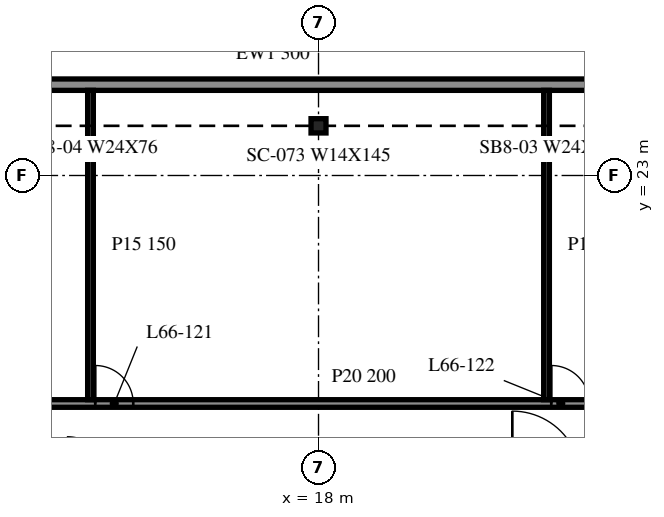
"""IFC4 building model, lengths in metres.
Left out: names, types, materials, properties, quantities, classifications, styles, units other than length and angle.
Written with IfcOpenShell. Run it as: python <this file> out.ifc"""

import sys

from ifc_helpers import new_model, si_unit, direction, frame, frame_2d, origin, origin_2d, place, context, subcontext, project, spatial, rectangle, i_section, extrude, element, fill, save


model = new_model("IFC4")
c1 = context("Model", 3, precision=1e-05, world=origin(), true_north=direction((0.0, 1.0)))
c2 = subcontext(c1, "Body", "Model", "MODEL_VIEW")
j1 = project(units=[si_unit("LENGTHUNIT", "METRE"), si_unit("PLANEANGLEUNIT", "RADIAN")], contexts=[c1])
p1 = place(None, origin())
s1 = spatial("IfcSite", under=j1, at=p1, CompositionType="ELEMENT")
p2 = place(p1, origin())
s2 = spatial("IfcBuilding", under=s1, at=p2, CompositionType="ELEMENT")
p3 = place(p2, frame((0.0, 0.0, 270.9)))
s3 = spatial("IfcBuildingStorey", under=s2, at=p3, CompositionType="ELEMENT", Elevation=270.9)
p4 = place(p3, frame((18.0, 24.307, -0.34), z_axis=(0.0, 0.0, 1.0), x_axis=(1.0, 0.0, 0.0)))
e1 = element("IfcColumn", 1, at=p4, inside=s3, PredefinedType="COLUMN", context=c2, shape_type="SweptSolid", body=[
    extrude(i_section(OverallWidth=0.394, OverallDepth=0.376, WebThickness=0.017, FlangeThickness=0.028, at=origin_2d()), origin(), (0.0, 0.0, 1.0), 3.8),
])
p5 = place(p3, frame((42.0, 25.39, 0.0), z_axis=(0.0, 0.0, 1.0), x_axis=(-1.0, 0.0, 0.0)))
e2 = element("IfcWall", 2, at=p5, inside=s3, PredefinedType="NOTDEFINED", context=c2, shape_type="SweptSolid", body=[
    extrude(rectangle(XDim=84.0, YDim=0.3, at=frame_2d((42.0, 0.0))), origin(), (0.0, 0.0, 1.0), 2.853),
])
p6 = place(p3, frame((-47.975, 17.0, 0.0), z_axis=(0.0, 0.0, 1.0), x_axis=(1.0, 0.0, 0.0)))
e3 = element("IfcWall", 3, at=p6, inside=s3, PredefinedType="PARTITIONING", context=c2, shape_type="SweptSolid", body=[
    extrude(rectangle(XDim=95.95, YDim=0.2, at=frame_2d((47.975, 0.0))), origin(), (0.0, 0.0, 1.0), 3.46),
])
p7 = place(p6, frame((10.7, 0.0, 0.0)))
e4 = element("IfcOpeningElement", 4, at=p7, cuts=e3, PredefinedType="OPENING", context=c2, shape_type="SweptSolid", body=[
    extrude(rectangle(XDim=0.9, YDim=2.1, at=frame_2d((0.45, 1.05))), frame((0.0, 0.11, 0.0), z_axis=(0.0, -1.0, 0.0), x_axis=(1.0, 0.0, 0.0)), (0.0, 0.0, 1.0), 0.22),
])
p8 = place(p6, frame((13.7, 0.0, 0.0)))
e5 = element("IfcOpeningElement", 5, at=p8, cuts=e3, PredefinedType="OPENING", context=c2, shape_type="SweptSolid", body=[
    extrude(rectangle(XDim=0.9, YDim=2.1, at=frame_2d((0.45, 1.05))), frame((0.0, 0.11, 0.0), z_axis=(0.0, -1.0, 0.0), x_axis=(1.0, 0.0, 0.0)), (0.0, 0.0, 1.0), 0.22),
])
p9 = place(p6, frame((22.5, 0.0, 0.0)))
e6 = element("IfcOpeningElement", 6, at=p9, cuts=e3, PredefinedType="OPENING", context=c2, shape_type="SweptSolid", body=[
    extrude(rectangle(XDim=1.0, YDim=2.1, at=frame_2d((0.5, 1.05))), frame((0.0, 0.11, 0.0), z_axis=(0.0, -1.0, 0.0), x_axis=(1.0, 0.0, 0.0)), (0.0, 0.0, 1.0), 0.22),
])
p10 = place(p6, frame((28.5, 0.0, 0.0)))
e7 = element("IfcOpeningElement", 7, at=p10, cuts=e3, PredefinedType="OPENING", context=c2, shape_type="SweptSolid", body=[
    extrude(rectangle(XDim=1.0, YDim=2.1, at=frame_2d((0.5, 1.05))), frame((0.0, 0.11, 0.0), z_axis=(0.0, -1.0, 0.0), x_axis=(1.0, 0.0, 0.0)), (0.0, 0.0, 1.0), 0.22),
])
p11 = place(p6, frame((40.7, 0.0, 0.0)))
e8 = element("IfcOpeningElement", 8, at=p11, cuts=e3, PredefinedType="OPENING", context=c2, shape_type="SweptSolid", body=[
    extrude(rectangle(XDim=0.9, YDim=2.1, at=frame_2d((0.45, 1.05))), frame((0.0, 0.11, 0.0), z_axis=(0.0, -1.0, 0.0), x_axis=(1.0, 0.0, 0.0)), (0.0, 0.0, 1.0), 0.22),
])
p12 = place(p6, frame((43.5, 0.0, 0.0)))
e9 = element("IfcOpeningElement", 9, at=p12, cuts=e3, PredefinedType="OPENING", context=c2, shape_type="SweptSolid", body=[
    extrude(rectangle(XDim=1.0, YDim=2.1, at=frame_2d((0.5, 1.05))), frame((0.0, 0.11, 0.0), z_axis=(0.0, -1.0, 0.0), x_axis=(1.0, 0.0, 0.0)), (0.0, 0.0, 1.0), 0.22),
])
p13 = place(p6, frame((47.3, 0.0, 0.0)))
e10 = element("IfcOpeningElement", 10, at=p13, cuts=e3, PredefinedType="OPENING", context=c2, shape_type="SweptSolid", body=[
    extrude(rectangle(XDim=0.9, YDim=2.1, at=frame_2d((0.45, 1.05))), frame((0.0, 0.11, 0.0), z_axis=(0.0, -1.0, 0.0), x_axis=(1.0, 0.0, 0.0)), (0.0, 0.0, 1.0), 0.22),
])
p14 = place(p6, frame((54.1, 0.0, 0.0)))
e11 = element("IfcOpeningElement", 11, at=p14, cuts=e3, PredefinedType="OPENING", context=c2, shape_type="SweptSolid", body=[
    extrude(rectangle(XDim=0.9, YDim=2.1, at=frame_2d((0.45, 1.05))), frame((0.0, 0.11, 0.0), z_axis=(0.0, -1.0, 0.0), x_axis=(1.0, 0.0, 0.0)), (0.0, 0.0, 1.0), 0.22),
])
p15 = place(p6, frame((60.1, 0.0, 0.0)))
e12 = element("IfcOpeningElement", 12, at=p15, cuts=e3, PredefinedType="OPENING", context=c2, shape_type="SweptSolid", body=[
    extrude(rectangle(XDim=1.0, YDim=2.1, at=frame_2d((0.5, 1.05))), frame((0.0, 0.11, 0.0), z_axis=(0.0, -1.0, 0.0), x_axis=(1.0, 0.0, 0.0)), (0.0, 0.0, 1.0), 0.22),
])
p16 = place(p6, frame((72.1, 0.0, 0.0)))
e13 = element("IfcOpeningElement", 13, at=p16, cuts=e3, PredefinedType="OPENING", context=c2, shape_type="SweptSolid", body=[
    extrude(rectangle(XDim=1.0, YDim=2.1, at=frame_2d((0.5, 1.05))), frame((0.0, 0.11, 0.0), z_axis=(0.0, -1.0, 0.0), x_axis=(1.0, 0.0, 0.0)), (0.0, 0.0, 1.0), 0.22),
])
p17 = place(p6, frame((75.1, 0.0, 0.0)))
e14 = element("IfcOpeningElement", 14, at=p17, cuts=e3, PredefinedType="OPENING", context=c2, shape_type="SweptSolid", body=[
    extrude(rectangle(XDim=0.9, YDim=2.1, at=frame_2d((0.45, 1.05))), frame((0.0, 0.11, 0.0), z_axis=(0.0, -1.0, 0.0), x_axis=(1.0, 0.0, 0.0)), (0.0, 0.0, 1.0), 0.22),
])
p18 = place(p6, frame((84.1, 0.0, 0.0)))
e15 = element("IfcOpeningElement", 15, at=p18, cuts=e3, PredefinedType="OPENING", context=c2, shape_type="SweptSolid", body=[
    extrude(rectangle(XDim=1.0, YDim=2.1, at=frame_2d((0.5, 1.05))), frame((0.0, 0.11, 0.0), z_axis=(0.0, -1.0, 0.0), x_axis=(1.0, 0.0, 0.0)), (0.0, 0.0, 1.0), 0.22),
])
p19 = place(p6, frame((90.1, 0.0, 0.0)))
e16 = element("IfcOpeningElement", 16, at=p19, cuts=e3, PredefinedType="OPENING", context=c2, shape_type="SweptSolid", body=[
    extrude(rectangle(XDim=0.9, YDim=2.1, at=frame_2d((0.45, 1.05))), frame((0.0, 0.11, 0.0), z_axis=(0.0, -1.0, 0.0), x_axis=(1.0, 0.0, 0.0)), (0.0, 0.0, 1.0), 0.22),
])
for number, where, z_axis, x_axis in (
    (17, (12.0, 17.1, 0.0), (0.0, 0.0, 1.0), (0.0, 1.0, 0.0)),
    (18, (24.0, 17.1, 0.0), (0.0, 0.0, 1.0), (0.0, 1.0, 0.0)),
):
    element("IfcWall", number, at=place(p3, frame(where, z_axis=z_axis, x_axis=x_axis)), inside=s3, PredefinedType="PARTITIONING", context=c2, shape_type="SweptSolid", body=[
        extrude(rectangle(XDim=8.14, YDim=0.15, at=frame_2d((4.07, 0.0))), origin(), (0.0, 0.0, 1.0), 3.46),
    ])
p20 = place(p15, origin())
e19 = element("IfcDoor", 19, at=p20, inside=s3, OperationType="SINGLE_SWING_RIGHT", PredefinedType="DOOR", context=c2, shape_type="SweptSolid", body=[
    extrude(rectangle(XDim=1.0, YDim=2.1, at=frame_2d((0.5, 1.05))), frame((0.0, 0.025, 0.0), z_axis=(0.0, -1.0, 0.0), x_axis=(1.0, 0.0, 0.0)), (0.0, 0.0, 1.0), 0.05),
])
fill(e12, e19)
p21 = place(p16, origin())
e20 = element("IfcDoor", 20, at=p21, inside=s3, OperationType="SINGLE_SWING_RIGHT", PredefinedType="DOOR", context=c2, shape_type="SweptSolid", body=[
    extrude(rectangle(XDim=1.0, YDim=2.1, at=frame_2d((0.5, 1.05))), frame((0.0, 0.025, 0.0), z_axis=(0.0, -1.0, 0.0), x_axis=(1.0, 0.0, 0.0)), (0.0, 0.0, 1.0), 0.05),
])
fill(e13, e20)
save(model, sys.argv[1])
